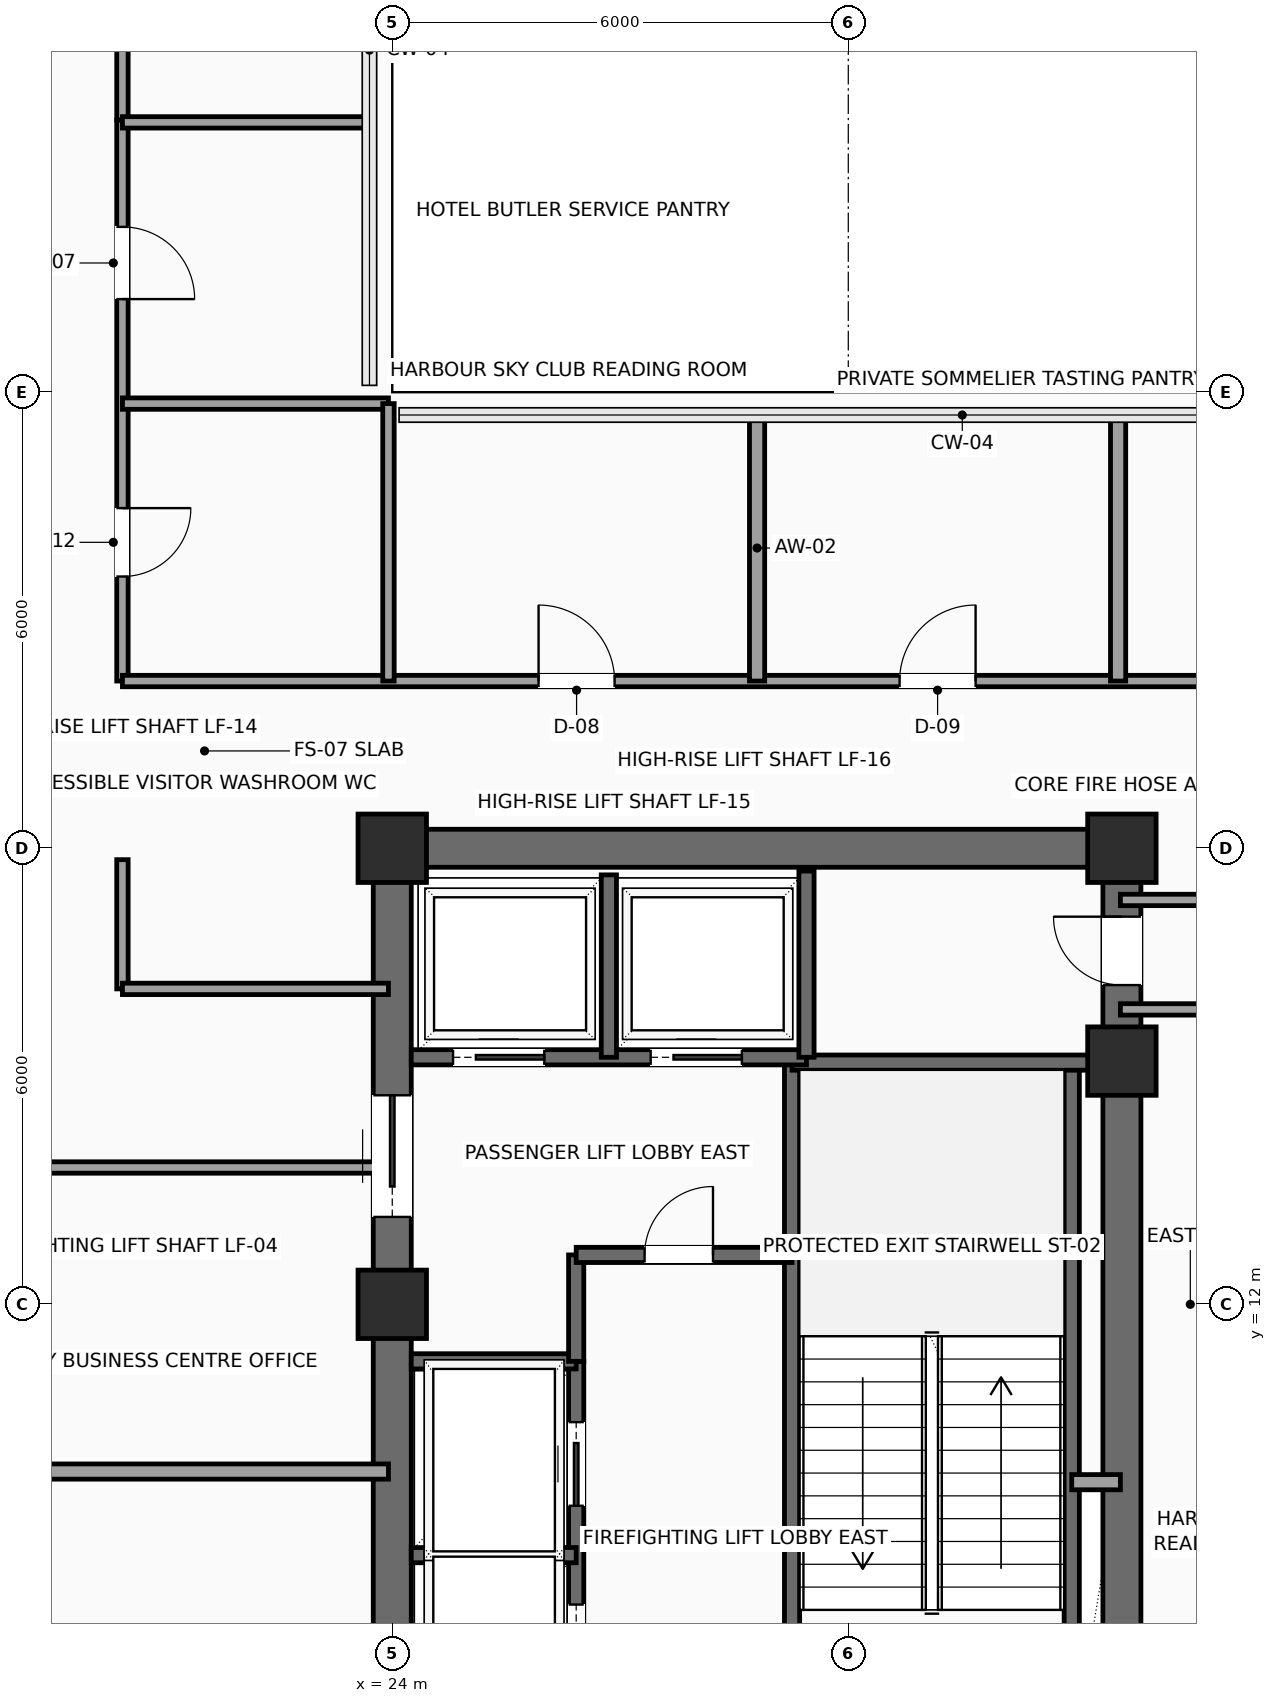
"""IFC4 building model, lengths in metres.
Left out: names, types, materials, properties, quantities, classifications, styles, units other than length and angle.
Written with IfcOpenShell. Run it as: python <this file> out.ifc"""

import sys

from ifc_helpers import new_model, si_unit, direction, frame, frame_2d, origin, origin_2d, place, context, subcontext, project, spatial, rectangle, extrude, element, fill, save


model = new_model("IFC4")
c1 = context("Model", 3, precision=1e-05, world=origin(), true_north=direction((0.0, 1.0)))
c2 = subcontext(c1, "Body", "Model", "MODEL_VIEW")
j1 = project(units=[si_unit("LENGTHUNIT", "METRE"), si_unit("PLANEANGLEUNIT", "RADIAN")], contexts=[c1])
p1 = place(None, origin())
s1 = spatial("IfcSite", under=j1, at=p1, CompositionType="ELEMENT")
p2 = place(p1, origin())
s2 = spatial("IfcBuilding", under=s1, at=p2, CompositionType="ELEMENT")
p3 = place(p2, frame((0.0, 0.0, 227.4)))
s3 = spatial("IfcBuildingStorey", under=s2, at=p3, CompositionType="ELEMENT", Elevation=227.4)
for number, where, z_axis, x_axis in (
    (1, (24.0, 12.0, 0.0), (0.0, 0.0, 1.0), (1.0, 0.0, 0.0)),
    (2, (24.0, 18.0, 0.0), (0.0, 0.0, 1.0), (1.0, 0.0, 0.0)),
    (3, (33.6, 15.2, 0.0), (0.0, 0.0, 1.0), (1.0, 0.0, 0.0)),
    (4, (33.6, 18.0, 0.0), (0.0, 0.0, 1.0), (1.0, 0.0, 0.0)),
):
    element("IfcColumn", number, at=place(p3, frame(where, z_axis=z_axis, x_axis=x_axis)), inside=s3, PredefinedType="COLUMN", context=c2, shape_type="SweptSolid", body=[
        extrude(rectangle(XDim=0.9, YDim=0.9, at=origin_2d()), origin(), (0.0, 0.0, 1.0), 3.75),
    ])
p4 = place(p3, frame((24.0, 18.0, 0.0), z_axis=(0.0, 0.0, 1.0), x_axis=(1.0, 0.0, 0.0)))
e5 = element("IfcWall", 5, at=p4, inside=s3, PredefinedType="SHEAR", context=c2, shape_type="SweptSolid", body=[
    extrude(rectangle(XDim=9.6, YDim=0.5, at=frame_2d((4.8, 0.0))), origin(), (0.0, 0.0, 1.0), 3.54),
])
p5 = place(p3, frame((24.0, 6.0, 0.0), z_axis=(0.0, 0.0, 1.0), x_axis=(0.0, 1.0, 0.0)))
e6 = element("IfcWall", 6, at=p5, inside=s3, PredefinedType="SHEAR", context=c2, shape_type="SweptSolid", body=[
    extrude(rectangle(XDim=12.0, YDim=0.5, at=frame_2d((6.0, 0.0))), origin(), (0.0, 0.0, 1.0), 3.54),
])
p6 = place(p5, frame((7.15, 0.0, 0.0)))
e7 = element("IfcOpeningElement", 7, at=p6, cuts=e6, PredefinedType="OPENING", context=c2, shape_type="SweptSolid", body=[
    extrude(rectangle(XDim=1.6, YDim=2.3, at=frame_2d((0.8, 1.15))), frame((0.0, 0.26, 0.0), z_axis=(0.0, -1.0, 0.0), x_axis=(1.0, 0.0, 0.0)), (0.0, 0.0, 1.0), 0.52),
])
p7 = place(p3, frame((33.6, 6.0, 0.0), z_axis=(0.0, 0.0, 1.0), x_axis=(0.0, 1.0, 0.0)))
e8 = element("IfcWall", 8, at=p7, inside=s3, PredefinedType="SHEAR", context=c2, shape_type="SweptSolid", body=[
    extrude(rectangle(XDim=12.0, YDim=0.5, at=frame_2d((6.0, 0.0))), origin(), (0.0, 0.0, 1.0), 3.54),
])
p8 = place(p7, frame((10.2, 0.0, 0.0)))
e9 = element("IfcOpeningElement", 9, at=p8, cuts=e8, PredefinedType="OPENING", context=c2, shape_type="SweptSolid", body=[
    extrude(rectangle(XDim=0.9, YDim=2.15, at=frame_2d((0.45, 1.075))), frame((0.0, 0.26, 0.0), z_axis=(0.0, -1.0, 0.0), x_axis=(1.0, 0.0, 0.0)), (0.0, 0.0, 1.0), 0.52),
])
p9 = place(p3, frame((29.26, 6.3, 0.0), z_axis=(0.0, 0.0, 1.0), x_axis=(0.0, 1.0, 0.0)))
e10 = element("IfcWall", 10, at=p9, inside=s3, PredefinedType="SHEAR", context=c2, shape_type="SweptSolid", body=[
    extrude(rectangle(XDim=8.88, YDim=0.2, at=frame_2d((4.44, 0.0))), origin(), (0.0, 0.0, 1.0), 3.54),
])
p10 = place(p9, frame((0.35, 0.0, 0.0)))
e11 = element("IfcOpeningElement", 11, at=p10, cuts=e10, PredefinedType="OPENING", context=c2, shape_type="SweptSolid", body=[
    extrude(rectangle(XDim=1.1, YDim=2.2, at=frame_2d((0.55, 1.1))), frame((0.0, 0.11, 0.0), z_axis=(0.0, -1.0, 0.0), x_axis=(1.0, 0.0, 0.0)), (0.0, 0.0, 1.0), 0.22),
])
p11 = place(p3, frame((32.94, 6.3, 0.0), z_axis=(0.0, 0.0, 1.0), x_axis=(0.0, 1.0, 0.0)))
e12 = element("IfcWall", 12, at=p11, inside=s3, PredefinedType="SHEAR", context=c2, shape_type="SweptSolid", body=[
    extrude(rectangle(XDim=8.88, YDim=0.2, at=frame_2d((4.44, 0.0))), origin(), (0.0, 0.0, 1.0), 3.54),
])
p12 = place(p3, frame((29.26, 15.18, 0.0), z_axis=(0.0, 0.0, 1.0), x_axis=(1.0, 0.0, 0.0)))
e13 = element("IfcWall", 13, at=p12, inside=s3, PredefinedType="SHEAR", context=c2, shape_type="SweptSolid", body=[
    extrude(rectangle(XDim=4.04, YDim=0.2, at=frame_2d((2.02, 0.0))), origin(), (0.0, 0.0, 1.0), 3.54),
])
p13 = place(p3, frame((26.42, 6.3, 0.0), z_axis=(0.0, 0.0, 1.0), x_axis=(0.0, 1.0, 0.0)))
e14 = element("IfcWall", 14, at=p13, inside=s3, PredefinedType="SHEAR", context=c2, shape_type="SweptSolid", body=[
    extrude(rectangle(XDim=4.95, YDim=0.2, at=frame_2d((2.475, 0.0))), origin(), (0.0, 0.0, 1.0), 3.54),
])
p14 = place(p13, frame((0.65, 0.0, 0.0)))
e15 = element("IfcOpeningElement", 15, at=p14, cuts=e14, PredefinedType="OPENING", context=c2, shape_type="SweptSolid", body=[
    extrude(rectangle(XDim=1.1, YDim=2.2, at=frame_2d((0.55, 1.1))), frame((0.0, 0.11, 0.0), z_axis=(0.0, -1.0, 0.0), x_axis=(1.0, 0.0, 0.0)), (0.0, 0.0, 1.0), 0.22),
])
p15 = place(p13, frame((3.05, 0.0, 0.0)))
e16 = element("IfcOpeningElement", 16, at=p15, cuts=e14, PredefinedType="OPENING", context=c2, shape_type="SweptSolid", body=[
    extrude(rectangle(XDim=1.1, YDim=2.2, at=frame_2d((0.55, 1.1))), frame((0.0, 0.11, 0.0), z_axis=(0.0, -1.0, 0.0), x_axis=(1.0, 0.0, 0.0)), (0.0, 0.0, 1.0), 0.22),
])
for number, where, z_axis, x_axis in (
    (17, (24.25, 8.7, 0.0), (0.0, 0.0, 1.0), (1.0, 0.0, 0.0)),
    (18, (24.25, 11.25, 0.0), (0.0, 0.0, 1.0), (1.0, 0.0, 0.0)),
):
    element("IfcWall", number, at=place(p3, frame(where, z_axis=z_axis, x_axis=x_axis)), inside=s3, PredefinedType="SHEAR", context=c2, shape_type="SweptSolid", body=[
        extrude(rectangle(XDim=2.17, YDim=0.2, at=frame_2d((1.085, 0.0))), origin(), (0.0, 0.0, 1.0), 3.54),
    ])
p16 = place(p3, frame((26.42, 11.25, 0.0), z_axis=(0.0, 0.0, 1.0), x_axis=(0.0, 1.0, 0.0)))
e19 = element("IfcWall", 19, at=p16, inside=s3, PredefinedType="SHEAR", context=c2, shape_type="SweptSolid", body=[
    extrude(rectangle(XDim=1.4, YDim=0.2, at=frame_2d((0.7, 0.0))), origin(), (0.0, 0.0, 1.0), 3.54),
])
p17 = place(p3, frame((26.42, 12.65, 0.0), z_axis=(0.0, 0.0, 1.0), x_axis=(1.0, 0.0, 0.0)))
e20 = element("IfcWall", 20, at=p17, inside=s3, PredefinedType="SHEAR", context=c2, shape_type="SweptSolid", body=[
    extrude(rectangle(XDim=2.84, YDim=0.2, at=frame_2d((1.42, 0.0))), origin(), (0.0, 0.0, 1.0), 3.54),
])
p18 = place(p17, frame((0.9, 0.0, 0.0)))
e21 = element("IfcOpeningElement", 21, at=p18, cuts=e20, PredefinedType="OPENING", context=c2, shape_type="SweptSolid", body=[
    extrude(rectangle(XDim=0.9, YDim=2.15, at=frame_2d((0.45, 1.075))), frame((0.0, 0.11, 0.0), z_axis=(0.0, -1.0, 0.0), x_axis=(1.0, 0.0, 0.0)), (0.0, 0.0, 1.0), 0.22),
])
p19 = place(p3, frame((32.94, 9.66, 0.0), z_axis=(0.0, 0.0, 1.0), x_axis=(1.0, 0.0, 0.0)))
e22 = element("IfcWall", 22, at=p19, inside=s3, PredefinedType="SOLIDWALL", context=c2, shape_type="SweptSolid", body=[
    extrude(rectangle(XDim=0.64, YDim=0.2, at=frame_2d((0.32, 0.0))), origin(), (0.0, 0.0, 1.0), 3.54),
])
p20 = place(p3, frame((24.25, 15.25, 0.0), z_axis=(0.0, 0.0, 1.0), x_axis=(1.0, 0.0, 0.0)))
e23 = element("IfcWall", 23, at=p20, inside=s3, PredefinedType="SHEAR", context=c2, shape_type="SweptSolid", body=[
    extrude(rectangle(XDim=5.2, YDim=0.2, at=frame_2d((2.6, 0.0))), origin(), (0.0, 0.0, 1.0), 3.54),
])
p21 = place(p20, frame((0.55, 0.0, 0.0)))
e24 = element("IfcOpeningElement", 24, at=p21, cuts=e23, PredefinedType="OPENING", context=c2, shape_type="SweptSolid", body=[
    extrude(rectangle(XDim=1.2, YDim=2.2, at=frame_2d((0.6, 1.1))), frame((0.0, 0.11, 0.0), z_axis=(0.0, -1.0, 0.0), x_axis=(1.0, 0.0, 0.0)), (0.0, 0.0, 1.0), 0.22),
])
p22 = place(p20, frame((3.15, 0.0, 0.0)))
e25 = element("IfcOpeningElement", 25, at=p22, cuts=e23, PredefinedType="OPENING", context=c2, shape_type="SweptSolid", body=[
    extrude(rectangle(XDim=1.2, YDim=2.2, at=frame_2d((0.6, 1.1))), frame((0.0, 0.11, 0.0), z_axis=(0.0, -1.0, 0.0), x_axis=(1.0, 0.0, 0.0)), (0.0, 0.0, 1.0), 0.22),
])
p23 = place(p3, frame((26.85, 15.25, 0.0), z_axis=(0.0, 0.0, 1.0), x_axis=(0.0, 1.0, 0.0)))
e26 = element("IfcWall", 26, at=p23, inside=s3, PredefinedType="SHEAR", context=c2, shape_type="SweptSolid", body=[
    extrude(rectangle(XDim=2.4, YDim=0.2, at=frame_2d((1.2, 0.0))), origin(), (0.0, 0.0, 1.0), 3.54),
])
p24 = place(p3, frame((29.45, 15.25, 0.0), z_axis=(0.0, 0.0, 1.0), x_axis=(0.0, 1.0, 0.0)))
e27 = element("IfcWall", 27, at=p24, inside=s3, PredefinedType="SHEAR", context=c2, shape_type="SweptSolid", body=[
    extrude(rectangle(XDim=2.45, YDim=0.2, at=frame_2d((1.225, 0.0))), origin(), (0.0, 0.0, 1.0), 3.54),
])
p25 = place(p3, frame((20.45, 30.25, 0.0), z_axis=(0.0, 0.0, 1.0), x_axis=(0.0, -1.0, 0.0)))
e28 = element("IfcWall", 28, at=p25, inside=s3, PredefinedType="PARTITIONING", context=c2, shape_type="SweptSolid", body=[
    extrude(rectangle(XDim=2.67, YDim=0.15, at=frame_2d((1.335, 0.0))), origin(), (0.0, 0.0, 1.0), 3.54),
])
p26 = place(p3, frame((20.45, 27.58, 0.0), z_axis=(0.0, 0.0, 1.0), x_axis=(0.0, -1.0, 0.0)))
e29 = element("IfcWall", 29, at=p26, inside=s3, PredefinedType="PARTITIONING", context=c2, shape_type="SweptSolid", body=[
    extrude(rectangle(XDim=7.38, YDim=0.15, at=frame_2d((3.69, 0.0))), origin(), (0.0, 0.0, 1.0), 3.54),
])
p27 = place(p26, frame((5.105, 0.0, 0.0)))
e30 = element("IfcOpeningElement", 30, at=p27, cuts=e29, PredefinedType="OPENING", context=c2, shape_type="SweptSolid", body=[
    extrude(rectangle(XDim=0.9, YDim=2.1, at=frame_2d((0.45, 1.05))), frame((0.0, 0.085, 0.0), z_axis=(0.0, -1.0, 0.0), x_axis=(1.0, 0.0, 0.0)), (0.0, 0.0, 1.0), 0.17),
])
p28 = place(p26, frame((1.405, 0.0, 0.0)))
e31 = element("IfcOpeningElement", 31, at=p28, cuts=e29, PredefinedType="OPENING", context=c2, shape_type="SweptSolid", body=[
    extrude(rectangle(XDim=0.95, YDim=2.15, at=frame_2d((0.475, 1.075))), frame((0.0, 0.085, 0.0), z_axis=(0.0, -1.0, 0.0), x_axis=(1.0, 0.0, 0.0)), (0.0, 0.0, 1.0), 0.17),
])
p29 = place(p3, frame((20.45, 20.2, 0.0), z_axis=(0.0, 0.0, 1.0), x_axis=(1.0, 0.0, 0.0)))
e32 = element("IfcWall", 32, at=p29, inside=s3, PredefinedType="PARTITIONING", context=c2, shape_type="SweptSolid", body=[
    extrude(rectangle(XDim=15.7, YDim=0.15, at=frame_2d((7.85, 0.0))), origin(), (0.0, 0.0, 1.0), 3.54),
])
p30 = place(p29, frame((5.475, 0.0, 0.0)))
e33 = element("IfcOpeningElement", 33, at=p30, cuts=e32, PredefinedType="OPENING", context=c2, shape_type="SweptSolid", body=[
    extrude(rectangle(XDim=1.0, YDim=2.2, at=frame_2d((0.5, 1.1))), frame((0.0, 0.085, 0.0), z_axis=(0.0, -1.0, 0.0), x_axis=(1.0, 0.0, 0.0)), (0.0, 0.0, 1.0), 0.17),
])
p31 = place(p29, frame((10.225, 0.0, 0.0)))
e34 = element("IfcOpeningElement", 34, at=p31, cuts=e32, PredefinedType="OPENING", context=c2, shape_type="SweptSolid", body=[
    extrude(rectangle(XDim=1.0, YDim=2.2, at=frame_2d((0.5, 1.1))), frame((0.0, 0.085, 0.0), z_axis=(0.0, -1.0, 0.0), x_axis=(1.0, 0.0, 0.0)), (0.0, 0.0, 1.0), 0.17),
])
for number, where, z_axis, x_axis in (
    (35, (36.15, 15.88, 0.0), (0.0, 0.0, 1.0), (-1.0, 0.0, 0.0)),
    (36, (33.58, 17.32, 0.0), (0.0, 0.0, 1.0), (1.0, 0.0, 0.0)),
):
    element("IfcWall", number, at=place(p3, frame(where, z_axis=z_axis, x_axis=x_axis)), inside=s3, PredefinedType="PARTITIONING", context=c2, shape_type="SweptSolid", body=[
        extrude(rectangle(XDim=2.57, YDim=0.15, at=frame_2d((1.285, 0.0))), origin(), (0.0, 0.0, 1.0), 3.54),
    ])
p32 = place(p3, frame((20.45, 17.85, 0.0), z_axis=(0.0, 0.0, 1.0), x_axis=(0.0, -1.0, 0.0)))
e37 = element("IfcWall", 37, at=p32, inside=s3, PredefinedType="PARTITIONING", context=c2, shape_type="SweptSolid", body=[
    extrude(rectangle(XDim=1.7, YDim=0.15, at=frame_2d((0.85, 0.0))), origin(), (0.0, 0.0, 1.0), 3.54),
])
p33 = place(p3, frame((20.45, 16.15, 0.0), z_axis=(0.0, 0.0, 1.0), x_axis=(1.0, 0.0, 0.0)))
e38 = element("IfcWall", 38, at=p33, inside=s3, PredefinedType="PARTITIONING", context=c2, shape_type="SweptSolid", body=[
    extrude(rectangle(XDim=3.5, YDim=0.15, at=frame_2d((1.75, 0.0))), origin(), (0.0, 0.0, 1.0), 3.54),
])
p34 = place(p3, frame((23.95, 13.8, 0.0), z_axis=(0.0, 0.0, 1.0), x_axis=(-1.0, 0.0, 0.0)))
e39 = element("IfcWall", 39, at=p34, inside=s3, PredefinedType="PARTITIONING", context=c2, shape_type="SweptSolid", body=[
    extrude(rectangle(XDim=9.0, YDim=0.15, at=frame_2d((4.5, 0.0))), origin(), (0.0, 0.0, 1.0), 3.54),
])
p35 = place(p3, frame((20.45, 23.85, 0.0), z_axis=(0.0, 0.0, 1.0), x_axis=(1.0, 0.0, 0.0)))
e40 = element("IfcWall", 40, at=p35, inside=s3, PredefinedType="PARTITIONING", context=c2, shape_type="SweptSolid", body=[
    extrude(rectangle(XDim=3.5, YDim=0.15, at=frame_2d((1.75, 0.0))), origin(), (0.0, 0.0, 1.0), 3.54),
])
p36 = place(p3, frame((23.95, 20.2, 0.0), z_axis=(0.0, 0.0, 1.0), x_axis=(0.0, 1.0, 0.0)))
e41 = element("IfcWall", 41, at=p36, inside=s3, PredefinedType="PARTITIONING", context=c2, shape_type="SweptSolid", body=[
    extrude(rectangle(XDim=3.65, YDim=0.15, at=frame_2d((1.825, 0.0))), origin(), (0.0, 0.0, 1.0), 3.54),
])
p37 = place(p3, frame((20.45, 27.55, 0.0), z_axis=(0.0, 0.0, 1.0), x_axis=(1.0, 0.0, 0.0)))
e42 = element("IfcWall", 42, at=p37, inside=s3, PredefinedType="PARTITIONING", context=c2, shape_type="SweptSolid", body=[
    extrude(rectangle(XDim=3.25, YDim=0.15, at=frame_2d((1.625, 0.0))), origin(), (0.0, 0.0, 1.0), 3.54),
])
for number, where, z_axis, x_axis in (
    (43, (28.8, 20.2, 0.0), (0.0, 0.0, 1.0), (0.0, 1.0, 0.0)),
    (44, (33.55, 20.2, 0.0), (0.0, 0.0, 1.0), (0.0, 1.0, 0.0)),
):
    element("IfcWall", number, at=place(p3, frame(where, z_axis=z_axis, x_axis=x_axis)), inside=s3, PredefinedType="PARTITIONING", context=c2, shape_type="SweptSolid", body=[
        extrude(rectangle(XDim=3.5, YDim=0.2, at=frame_2d((1.75, 0.0))), origin(), (0.0, 0.0, 1.0), 3.54),
    ])
p38 = place(p3, frame((14.95, 9.8, 0.0), z_axis=(0.0, 0.0, 1.0), x_axis=(1.0, 0.0, 0.0)))
e45 = element("IfcWall", 45, at=p38, inside=s3, PredefinedType="PARTITIONING", context=c2, shape_type="SweptSolid", body=[
    extrude(rectangle(XDim=9.0, YDim=0.2, at=frame_2d((4.5, 0.0))), origin(), (0.0, 0.0, 1.0), 3.54),
])
p39 = place(p6, origin())
e46 = element("IfcDoor", 46, at=p39, inside=s3, OperationType="DOUBLE_DOOR_SLIDING", PredefinedType="DOOR", context=c2, shape_type="SweptSolid", body=[
    extrude(rectangle(XDim=1.6, YDim=2.3, at=frame_2d((0.8, 1.15))), frame((0.0, 0.025, 0.0), z_axis=(0.0, -1.0, 0.0), x_axis=(1.0, 0.0, 0.0)), (0.0, 0.0, 1.0), 0.05),
])
fill(e7, e46)
p40 = place(p8, origin())
e47 = element("IfcDoor", 47, at=p40, inside=s3, OperationType="SINGLE_SWING_RIGHT", PredefinedType="DOOR", context=c2, shape_type="SweptSolid", body=[
    extrude(rectangle(XDim=0.9, YDim=2.15, at=frame_2d((0.45, 1.075))), frame((0.0, 0.025, 0.0), z_axis=(0.0, -1.0, 0.0), x_axis=(1.0, 0.0, 0.0)), (0.0, 0.0, 1.0), 0.05),
])
fill(e9, e47)
p41 = place(p14, origin())
e48 = element("IfcDoor", 48, at=p41, inside=s3, OperationType="SLIDING_TO_LEFT", PredefinedType="DOOR", context=c2, shape_type="SweptSolid", body=[
    extrude(rectangle(XDim=1.1, YDim=2.2, at=frame_2d((0.55, 1.1))), frame((0.0, 0.025, 0.0), z_axis=(0.0, -1.0, 0.0), x_axis=(1.0, 0.0, 0.0)), (0.0, 0.0, 1.0), 0.05),
])
fill(e15, e48)
p42 = place(p15, origin())
e49 = element("IfcDoor", 49, at=p42, inside=s3, OperationType="SLIDING_TO_LEFT", PredefinedType="DOOR", context=c2, shape_type="SweptSolid", body=[
    extrude(rectangle(XDim=1.1, YDim=2.2, at=frame_2d((0.55, 1.1))), frame((0.0, 0.025, 0.0), z_axis=(0.0, -1.0, 0.0), x_axis=(1.0, 0.0, 0.0)), (0.0, 0.0, 1.0), 0.05),
])
fill(e16, e49)
p43 = place(p18, origin())
e50 = element("IfcDoor", 50, at=p43, inside=s3, OperationType="SINGLE_SWING_RIGHT", PredefinedType="DOOR", context=c2, shape_type="SweptSolid", body=[
    extrude(rectangle(XDim=0.9, YDim=2.15, at=frame_2d((0.45, 1.075))), frame((0.0, 0.025, 0.0), z_axis=(0.0, -1.0, 0.0), x_axis=(1.0, 0.0, 0.0)), (0.0, 0.0, 1.0), 0.05),
])
fill(e21, e50)
p44 = place(p21, origin())
e51 = element("IfcDoor", 51, at=p44, inside=s3, OperationType="SLIDING_TO_RIGHT", PredefinedType="DOOR", context=c2, shape_type="SweptSolid", body=[
    extrude(rectangle(XDim=1.2, YDim=2.2, at=frame_2d((0.6, 1.1))), frame((0.0, 0.025, 0.0), z_axis=(0.0, -1.0, 0.0), x_axis=(1.0, 0.0, 0.0)), (0.0, 0.0, 1.0), 0.05),
])
fill(e24, e51)
p45 = place(p22, origin())
e52 = element("IfcDoor", 52, at=p45, inside=s3, OperationType="SLIDING_TO_RIGHT", PredefinedType="DOOR", context=c2, shape_type="SweptSolid", body=[
    extrude(rectangle(XDim=1.2, YDim=2.2, at=frame_2d((0.6, 1.1))), frame((0.0, 0.025, 0.0), z_axis=(0.0, -1.0, 0.0), x_axis=(1.0, 0.0, 0.0)), (0.0, 0.0, 1.0), 0.05),
])
fill(e25, e52)
p46 = place(p27, origin())
e53 = element("IfcDoor", 53, at=p46, inside=s3, OperationType="SINGLE_SWING_LEFT", PredefinedType="DOOR", context=c2, shape_type="SweptSolid", body=[
    extrude(rectangle(XDim=0.9, YDim=2.1, at=frame_2d((0.45, 1.05))), frame((0.0, 0.025, 0.0), z_axis=(0.0, -1.0, 0.0), x_axis=(1.0, 0.0, 0.0)), (0.0, 0.0, 1.0), 0.05),
])
fill(e30, e53)
p47 = place(p28, origin())
e54 = element("IfcDoor", 54, at=p47, inside=s3, OperationType="SINGLE_SWING_RIGHT", PredefinedType="DOOR", context=c2, shape_type="SweptSolid", body=[
    extrude(rectangle(XDim=0.95, YDim=2.15, at=frame_2d((0.475, 1.075))), frame((0.0, 0.025, 0.0), z_axis=(0.0, -1.0, 0.0), x_axis=(1.0, 0.0, 0.0)), (0.0, 0.0, 1.0), 0.05),
])
fill(e31, e54)
p48 = place(p30, origin())
e55 = element("IfcDoor", 55, at=p48, inside=s3, OperationType="SINGLE_SWING_LEFT", PredefinedType="DOOR", context=c2, shape_type="SweptSolid", body=[
    extrude(rectangle(XDim=1.0, YDim=2.2, at=frame_2d((0.5, 1.1))), frame((0.0, 0.025, 0.0), z_axis=(0.0, -1.0, 0.0), x_axis=(1.0, 0.0, 0.0)), (0.0, 0.0, 1.0), 0.05),
])
fill(e33, e55)
p49 = place(p31, origin())
e56 = element("IfcDoor", 56, at=p49, inside=s3, OperationType="SINGLE_SWING_RIGHT", PredefinedType="DOOR", context=c2, shape_type="SweptSolid", body=[
    extrude(rectangle(XDim=1.0, YDim=2.2, at=frame_2d((0.5, 1.1))), frame((0.0, 0.025, 0.0), z_axis=(0.0, -1.0, 0.0), x_axis=(1.0, 0.0, 0.0)), (0.0, 0.0, 1.0), 0.05),
])
fill(e34, e56)
save(model, sys.argv[1])
